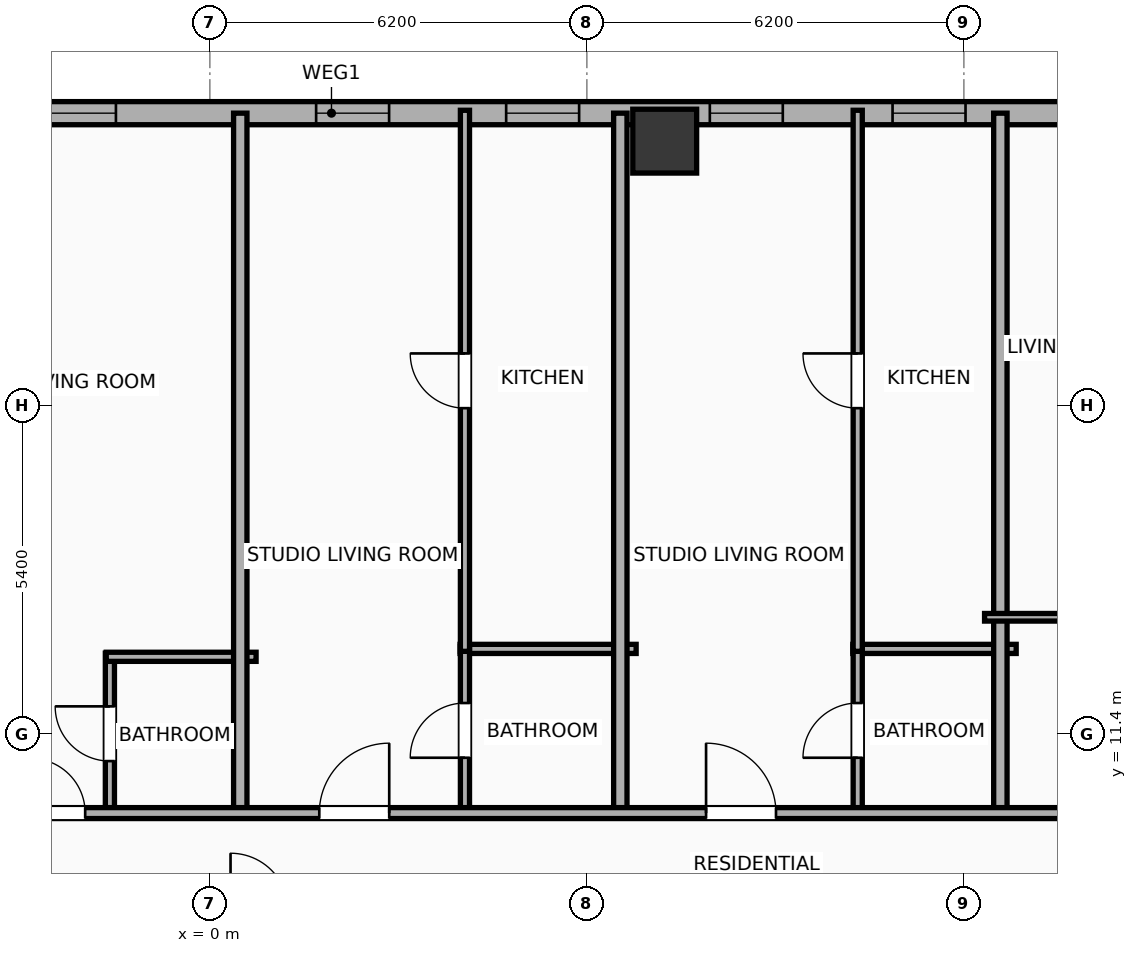
"""IFC4 building model, lengths in metres.
Left out: names, types, materials, properties, quantities, classifications, styles, units other than length and angle.
Written with IfcOpenShell. Run it as: python <this file> out.ifc"""

import sys

from ifc_helpers import new_model, si_unit, direction, frame, frame_2d, origin, origin_2d, place, context, subcontext, project, spatial, rectangle, hollow_rectangle, extrude, element, fill, save


model = new_model("IFC4")
c1 = context("Model", 3, precision=1e-05, world=origin(), true_north=direction((0.0, 1.0)))
c2 = subcontext(c1, "Body", "Model", "MODEL_VIEW")
j1 = project(units=[si_unit("LENGTHUNIT", "METRE"), si_unit("PLANEANGLEUNIT", "RADIAN")], contexts=[c1])
p1 = place(None, origin())
s1 = spatial("IfcSite", under=j1, at=p1, CompositionType="ELEMENT")
p2 = place(p1, origin())
s2 = spatial("IfcBuilding", under=s1, at=p2, CompositionType="ELEMENT")
p3 = place(p2, frame((0.0, 0.0, 124.8)))
s3 = spatial("IfcBuildingStorey", under=s2, at=p3, CompositionType="ELEMENT", Elevation=124.8)
p4 = place(p3, frame((7.48, 21.15, 0.0), z_axis=(0.0, 0.0, 1.0), x_axis=(1.0, 0.0, 0.0)))
e1 = element("IfcColumn", 1, at=p4, inside=s3, PredefinedType="COLUMN", context=c2, shape_type="SweptSolid", body=[
    extrude(hollow_rectangle(XDim=1.05, YDim=1.05, WallThickness=0.036, at=origin_2d()), origin(), (0.0, 0.0, 1.0), 3.9),
])
p5 = place(p3, frame((-25.381, 21.61, 0.0), z_axis=(0.0, 0.0, 1.0), x_axis=(1.0, 0.0, 0.0)))
e2 = element("IfcWall", 2, at=p5, inside=s3, PredefinedType="ELEMENTEDWALL", context=c2, shape_type="SweptSolid", body=[
    extrude(rectangle(XDim=54.763, YDim=0.38, at=frame_2d((27.381, 0.0))), origin(), (0.0, 0.0, 1.0), 3.65),
])
p6 = place(p5, frame((4.795, 0.0, 0.75)))
e3 = element("IfcOpeningElement", 3, at=p6, cuts=e2, PredefinedType="OPENING", context=c2, shape_type="SweptSolid", body=[
    extrude(rectangle(XDim=2.4, YDim=2.1, at=frame_2d((1.2, 1.05))), frame((0.0, 0.2, 0.0), z_axis=(0.0, -1.0, 0.0), x_axis=(1.0, 0.0, 0.0)), (0.0, 0.0, 1.0), 0.4),
])
p7 = place(p5, frame((45.867, 0.0, 0.75)))
e4 = element("IfcOpeningElement", 4, at=p7, cuts=e2, PredefinedType="OPENING", context=c2, shape_type="SweptSolid", body=[
    extrude(rectangle(XDim=2.4, YDim=2.1, at=frame_2d((1.2, 1.05))), frame((0.0, 0.2, 0.0), z_axis=(0.0, -1.0, 0.0), x_axis=(1.0, 0.0, 0.0)), (0.0, 0.0, 1.0), 0.4),
])
p8 = place(p5, frame((2.408, 0.0, 0.75)))
e5 = element("IfcOpeningElement", 5, at=p8, cuts=e2, PredefinedType="OPENING", context=c2, shape_type="SweptSolid", body=[
    extrude(rectangle(XDim=1.2, YDim=2.05, at=frame_2d((0.6, 1.025))), frame((0.0, 0.2, 0.0), z_axis=(0.0, -1.0, 0.0), x_axis=(1.0, 0.0, 0.0)), (0.0, 0.0, 1.0), 0.4),
])
p9 = place(p5, frame((8.952, 0.0, 0.75)))
e6 = element("IfcOpeningElement", 6, at=p9, cuts=e2, PredefinedType="OPENING", context=c2, shape_type="SweptSolid", body=[
    extrude(rectangle(XDim=1.2, YDim=2.05, at=frame_2d((0.6, 1.025))), frame((0.0, 0.2, 0.0), z_axis=(0.0, -1.0, 0.0), x_axis=(1.0, 0.0, 0.0)), (0.0, 0.0, 1.0), 0.4),
])
p10 = place(p5, frame((17.132, 0.0, 0.75)))
e7 = element("IfcOpeningElement", 7, at=p10, cuts=e2, PredefinedType="OPENING", context=c2, shape_type="SweptSolid", body=[
    extrude(rectangle(XDim=1.2, YDim=2.05, at=frame_2d((0.6, 1.025))), frame((0.0, 0.2, 0.0), z_axis=(0.0, -1.0, 0.0), x_axis=(1.0, 0.0, 0.0)), (0.0, 0.0, 1.0), 0.4),
])
p11 = place(p5, frame((14.007, 0.0, 0.75)))
e8 = element("IfcOpeningElement", 8, at=p11, cuts=e2, PredefinedType="OPENING", context=c2, shape_type="SweptSolid", body=[
    extrude(rectangle(XDim=1.2, YDim=2.05, at=frame_2d((0.6, 1.025))), frame((0.0, 0.2, 0.0), z_axis=(0.0, -1.0, 0.0), x_axis=(1.0, 0.0, 0.0)), (0.0, 0.0, 1.0), 0.4),
])
p12 = place(p5, frame((22.636, 0.0, 0.75)))
e9 = element("IfcOpeningElement", 9, at=p12, cuts=e2, PredefinedType="OPENING", context=c2, shape_type="SweptSolid", body=[
    extrude(rectangle(XDim=1.2, YDim=2.05, at=frame_2d((0.6, 1.025))), frame((0.0, 0.2, 0.0), z_axis=(0.0, -1.0, 0.0), x_axis=(1.0, 0.0, 0.0)), (0.0, 0.0, 1.0), 0.4),
])
p13 = place(p5, frame((27.129, 0.0, 0.75)))
e10 = element("IfcOpeningElement", 10, at=p13, cuts=e2, PredefinedType="OPENING", context=c2, shape_type="SweptSolid", body=[
    extrude(rectangle(XDim=1.2, YDim=2.05, at=frame_2d((0.6, 1.025))), frame((0.0, 0.2, 0.0), z_axis=(0.0, -1.0, 0.0), x_axis=(1.0, 0.0, 0.0)), (0.0, 0.0, 1.0), 0.4),
])
p14 = place(p5, frame((30.254, 0.0, 0.75)))
e11 = element("IfcOpeningElement", 11, at=p14, cuts=e2, PredefinedType="OPENING", context=c2, shape_type="SweptSolid", body=[
    extrude(rectangle(XDim=1.2, YDim=2.05, at=frame_2d((0.6, 1.025))), frame((0.0, 0.2, 0.0), z_axis=(0.0, -1.0, 0.0), x_axis=(1.0, 0.0, 0.0)), (0.0, 0.0, 1.0), 0.4),
])
p15 = place(p5, frame((33.603, 0.0, 0.75)))
e12 = element("IfcOpeningElement", 12, at=p15, cuts=e2, PredefinedType="OPENING", context=c2, shape_type="SweptSolid", body=[
    extrude(rectangle(XDim=1.2, YDim=2.05, at=frame_2d((0.6, 1.025))), frame((0.0, 0.2, 0.0), z_axis=(0.0, -1.0, 0.0), x_axis=(1.0, 0.0, 0.0)), (0.0, 0.0, 1.0), 0.4),
])
p16 = place(p5, frame((36.608, 0.0, 0.75)))
e13 = element("IfcOpeningElement", 13, at=p16, cuts=e2, PredefinedType="OPENING", context=c2, shape_type="SweptSolid", body=[
    extrude(rectangle(XDim=1.2, YDim=2.05, at=frame_2d((0.6, 1.025))), frame((0.0, 0.2, 0.0), z_axis=(0.0, -1.0, 0.0), x_axis=(1.0, 0.0, 0.0)), (0.0, 0.0, 1.0), 0.4),
])
p17 = place(p5, frame((39.446, 0.0, 0.75)))
e14 = element("IfcOpeningElement", 14, at=p17, cuts=e2, PredefinedType="OPENING", context=c2, shape_type="SweptSolid", body=[
    extrude(rectangle(XDim=1.2, YDim=2.05, at=frame_2d((0.6, 1.025))), frame((0.0, 0.2, 0.0), z_axis=(0.0, -1.0, 0.0), x_axis=(1.0, 0.0, 0.0)), (0.0, 0.0, 1.0), 0.4),
])
p18 = place(p5, frame((42.27, 0.0, 0.75)))
e15 = element("IfcOpeningElement", 15, at=p18, cuts=e2, PredefinedType="OPENING", context=c2, shape_type="SweptSolid", body=[
    extrude(rectangle(XDim=0.85, YDim=2.05, at=frame_2d((0.425, 1.025))), frame((0.0, 0.2, 0.0), z_axis=(0.0, -1.0, 0.0), x_axis=(1.0, 0.0, 0.0)), (0.0, 0.0, 1.0), 0.4),
])
p19 = place(p5, frame((49.554, 0.0, 0.75)))
e16 = element("IfcOpeningElement", 16, at=p19, cuts=e2, PredefinedType="OPENING", context=c2, shape_type="SweptSolid", body=[
    extrude(rectangle(XDim=1.2, YDim=2.05, at=frame_2d((0.6, 1.025))), frame((0.0, 0.2, 0.0), z_axis=(0.0, -1.0, 0.0), x_axis=(1.0, 0.0, 0.0)), (0.0, 0.0, 1.0), 0.4),
])
p20 = place(p5, frame((52.266, 0.0, 0.75)))
e17 = element("IfcOpeningElement", 17, at=p20, cuts=e2, PredefinedType="OPENING", context=c2, shape_type="SweptSolid", body=[
    extrude(rectangle(XDim=1.2, YDim=2.05, at=frame_2d((0.6, 1.025))), frame((0.0, 0.2, 0.0), z_axis=(0.0, -1.0, 0.0), x_axis=(1.0, 0.0, 0.0)), (0.0, 0.0, 1.0), 0.4),
])
p21 = place(p3, frame((-1.644, 10.08, 0.0), z_axis=(0.0, 0.0, 1.0), x_axis=(0.0, 1.0, 0.0)))
e18 = element("IfcWall", 18, at=p21, inside=s3, PredefinedType="PLUMBINGWALL", context=c2, shape_type="SweptSolid", body=[
    extrude(rectangle(XDim=2.65, YDim=0.15, at=frame_2d((1.325, 0.0))), origin(), (0.0, 0.0, 1.0), 3.65),
])
p22 = place(p21, frame((0.875, 0.0, 0.0)))
e19 = element("IfcOpeningElement", 19, at=p22, cuts=e18, PredefinedType="OPENING", context=c2, shape_type="SweptSolid", body=[
    extrude(rectangle(XDim=0.9, YDim=2.05, at=frame_2d((0.45, 1.025))), frame((0.0, 0.085, 0.0), z_axis=(0.0, -1.0, 0.0), x_axis=(1.0, 0.0, 0.0)), (0.0, 0.0, 1.0), 0.17),
])
p23 = place(p3, frame((-1.704, 12.67, 0.0), z_axis=(0.0, 0.0, 1.0), x_axis=(1.0, 0.0, 0.0)))
e20 = element("IfcWall", 20, at=p23, inside=s3, PredefinedType="PLUMBINGWALL", context=c2, shape_type="SweptSolid", body=[
    extrude(rectangle(XDim=2.464, YDim=0.15, at=frame_2d((1.232, 0.0))), origin(), (0.0, 0.0, 1.0), 3.65),
])
p24 = place(p3, frame((0.5, 10.02, 0.0), z_axis=(0.0, 0.0, 1.0), x_axis=(0.0, 1.0, 0.0)))
e21 = element("IfcWall", 21, at=p24, inside=s3, PredefinedType="PARTITIONING", context=c2, shape_type="SweptSolid", body=[
    extrude(rectangle(XDim=11.59, YDim=0.22, at=frame_2d((5.795, 0.0))), origin(), (0.0, 0.0, 1.0), 3.65),
])
p25 = place(p3, frame((4.115, 12.8, 0.0), z_axis=(0.0, 0.0, 1.0), x_axis=(1.0, 0.0, 0.0)))
e22 = element("IfcWall", 22, at=p25, inside=s3, PredefinedType="PLUMBINGWALL", context=c2, shape_type="SweptSolid", body=[
    extrude(rectangle(XDim=2.895, YDim=0.15, at=frame_2d((1.448, 0.0))), origin(), (0.0, 0.0, 1.0), 3.65),
])
p26 = place(p3, frame((4.195, 10.08, 0.0), z_axis=(0.0, 0.0, 1.0), x_axis=(0.0, 1.0, 0.0)))
e23 = element("IfcWall", 23, at=p26, inside=s3, PredefinedType="PLUMBINGWALL", context=c2, shape_type="SweptSolid", body=[
    extrude(rectangle(XDim=2.76, YDim=0.15, at=frame_2d((1.38, 0.0))), origin(), (0.0, 0.0, 1.0), 3.65),
])
p27 = place(p26, frame((0.93, 0.0, 0.0)))
e24 = element("IfcOpeningElement", 24, at=p27, cuts=e23, PredefinedType="OPENING", context=c2, shape_type="SweptSolid", body=[
    extrude(rectangle(XDim=0.9, YDim=2.05, at=frame_2d((0.45, 1.025))), frame((0.0, 0.085, 0.0), z_axis=(0.0, -1.0, 0.0), x_axis=(1.0, 0.0, 0.0)), (0.0, 0.0, 1.0), 0.17),
])
p28 = place(p3, frame((4.195, 12.76, 0.0), z_axis=(0.0, 0.0, 1.0), x_axis=(0.0, 1.0, 0.0)))
e25 = element("IfcWall", 25, at=p28, inside=s3, PredefinedType="PLUMBINGWALL", context=c2, shape_type="SweptSolid", body=[
    extrude(rectangle(XDim=8.898, YDim=0.15, at=frame_2d((4.449, 0.0))), origin(), (0.0, 0.0, 1.0), 3.65),
])
p29 = place(p28, frame((3.999, 0.0, 0.0)))
e26 = element("IfcOpeningElement", 26, at=p29, cuts=e25, PredefinedType="OPENING", context=c2, shape_type="SweptSolid", body=[
    extrude(rectangle(XDim=0.9, YDim=2.05, at=frame_2d((0.45, 1.025))), frame((0.0, 0.085, 0.0), z_axis=(0.0, -1.0, 0.0), x_axis=(1.0, 0.0, 0.0)), (0.0, 0.0, 1.0), 0.17),
])
p30 = place(p3, frame((6.75, 10.02, 0.0), z_axis=(0.0, 0.0, 1.0), x_axis=(0.0, 1.0, 0.0)))
e27 = element("IfcWall", 27, at=p30, inside=s3, PredefinedType="PARTITIONING", context=c2, shape_type="SweptSolid", body=[
    extrude(rectangle(XDim=11.59, YDim=0.22, at=frame_2d((5.795, 0.0))), origin(), (0.0, 0.0, 1.0), 3.04),
])
p31 = place(p3, frame((10.574, 12.8, 0.0), z_axis=(0.0, 0.0, 1.0), x_axis=(1.0, 0.0, 0.0)))
e28 = element("IfcWall", 28, at=p31, inside=s3, PredefinedType="PLUMBINGWALL", context=c2, shape_type="SweptSolid", body=[
    extrude(rectangle(XDim=2.686, YDim=0.15, at=frame_2d((1.343, 0.0))), origin(), (0.0, 0.0, 1.0), 3.65),
])
p32 = place(p3, frame((10.654, 10.08, 0.0), z_axis=(0.0, 0.0, 1.0), x_axis=(0.0, 1.0, 0.0)))
e29 = element("IfcWall", 29, at=p32, inside=s3, PredefinedType="PLUMBINGWALL", context=c2, shape_type="SweptSolid", body=[
    extrude(rectangle(XDim=2.76, YDim=0.15, at=frame_2d((1.38, 0.0))), origin(), (0.0, 0.0, 1.0), 3.65),
])
p33 = place(p32, frame((0.93, 0.0, 0.0)))
e30 = element("IfcOpeningElement", 30, at=p33, cuts=e29, PredefinedType="OPENING", context=c2, shape_type="SweptSolid", body=[
    extrude(rectangle(XDim=0.9, YDim=2.05, at=frame_2d((0.45, 1.025))), frame((0.0, 0.085, 0.0), z_axis=(0.0, -1.0, 0.0), x_axis=(1.0, 0.0, 0.0)), (0.0, 0.0, 1.0), 0.17),
])
p34 = place(p3, frame((10.654, 12.76, 0.0), z_axis=(0.0, 0.0, 1.0), x_axis=(0.0, 1.0, 0.0)))
e31 = element("IfcWall", 31, at=p34, inside=s3, PredefinedType="PLUMBINGWALL", context=c2, shape_type="SweptSolid", body=[
    extrude(rectangle(XDim=8.898, YDim=0.15, at=frame_2d((4.449, 0.0))), origin(), (0.0, 0.0, 1.0), 3.65),
])
p35 = place(p34, frame((3.999, 0.0, 0.0)))
e32 = element("IfcOpeningElement", 32, at=p35, cuts=e31, PredefinedType="OPENING", context=c2, shape_type="SweptSolid", body=[
    extrude(rectangle(XDim=0.9, YDim=2.05, at=frame_2d((0.45, 1.025))), frame((0.0, 0.085, 0.0), z_axis=(0.0, -1.0, 0.0), x_axis=(1.0, 0.0, 0.0)), (0.0, 0.0, 1.0), 0.17),
])
p36 = place(p3, frame((13.0, 10.02, 0.0), z_axis=(0.0, 0.0, 1.0), x_axis=(0.0, 1.0, 0.0)))
e33 = element("IfcWall", 33, at=p36, inside=s3, PredefinedType="PARTITIONING", context=c2, shape_type="SweptSolid", body=[
    extrude(rectangle(XDim=11.59, YDim=0.22, at=frame_2d((5.795, 0.0))), origin(), (0.0, 0.0, 1.0), 3.65),
])
p37 = place(p3, frame((12.74, 13.32, 0.0), z_axis=(0.0, 0.0, 1.0), x_axis=(1.0, 0.0, 0.0)))
e34 = element("IfcWall", 34, at=p37, inside=s3, PredefinedType="PARTITIONING", context=c2, shape_type="SweptSolid", body=[
    extrude(rectangle(XDim=2.69, YDim=0.125, at=frame_2d((1.345, 0.0))), origin(), (0.0, 0.0, 1.0), 3.65),
])
p38 = place(p3, frame((-29.21, 10.1, 0.0), z_axis=(0.0, 0.0, 1.0), x_axis=(1.0, 0.0, 0.0)))
e35 = element("IfcWall", 35, at=p38, inside=s3, PredefinedType="PARTITIONING", context=c2, shape_type="SweptSolid", body=[
    extrude(rectangle(XDim=62.42, YDim=0.18, at=frame_2d((31.21, 0.0))), origin(), (0.0, 0.0, 1.0), 3.65),
])
p39 = place(p38, frame((2.54, 0.0, 0.0)))
e36 = element("IfcOpeningElement", 36, at=p39, cuts=e35, PredefinedType="OPENING", context=c2, shape_type="SweptSolid", body=[
    extrude(rectangle(XDim=0.9, YDim=2.05, at=frame_2d((0.45, 1.025))), frame((0.0, 0.1, 0.0), z_axis=(0.0, -1.0, 0.0), x_axis=(1.0, 0.0, 0.0)), (0.0, 0.0, 1.0), 0.2),
])
p40 = place(p38, frame((9.1, 0.0, 0.0)))
e37 = element("IfcOpeningElement", 37, at=p40, cuts=e35, PredefinedType="OPENING", context=c2, shape_type="SweptSolid", body=[
    extrude(rectangle(XDim=1.15, YDim=2.05, at=frame_2d((0.575, 1.025))), frame((0.0, 0.1, 0.0), z_axis=(0.0, -1.0, 0.0), x_axis=(1.0, 0.0, 0.0)), (0.0, 0.0, 1.0), 0.2),
])
p41 = place(p38, frame((14.063, 0.0, 0.0)))
e38 = element("IfcOpeningElement", 38, at=p41, cuts=e35, PredefinedType="OPENING", context=c2, shape_type="SweptSolid", body=[
    extrude(rectangle(XDim=0.9, YDim=2.05, at=frame_2d((0.45, 1.025))), frame((0.0, 0.1, 0.0), z_axis=(0.0, -1.0, 0.0), x_axis=(1.0, 0.0, 0.0)), (0.0, 0.0, 1.0), 0.2),
])
p42 = place(p38, frame((20.954, 0.0, 0.0)))
e39 = element("IfcOpeningElement", 39, at=p42, cuts=e35, PredefinedType="OPENING", context=c2, shape_type="SweptSolid", body=[
    extrude(rectangle(XDim=1.15, YDim=2.05, at=frame_2d((0.575, 1.025))), frame((0.0, 0.1, 0.0), z_axis=(0.0, -1.0, 0.0), x_axis=(1.0, 0.0, 0.0)), (0.0, 0.0, 1.0), 0.2),
])
p43 = place(p38, frame((26.26, 0.0, 0.0)))
e40 = element("IfcOpeningElement", 40, at=p43, cuts=e35, PredefinedType="OPENING", context=c2, shape_type="SweptSolid", body=[
    extrude(rectangle(XDim=0.9, YDim=2.05, at=frame_2d((0.45, 1.025))), frame((0.0, 0.1, 0.0), z_axis=(0.0, -1.0, 0.0), x_axis=(1.0, 0.0, 0.0)), (0.0, 0.0, 1.0), 0.2),
])
p44 = place(p38, frame((31.01, 0.0, 0.0)))
e41 = element("IfcOpeningElement", 41, at=p44, cuts=e35, PredefinedType="OPENING", context=c2, shape_type="SweptSolid", body=[
    extrude(rectangle(XDim=1.15, YDim=2.05, at=frame_2d((0.575, 1.025))), frame((0.0, 0.1, 0.0), z_axis=(0.0, -1.0, 0.0), x_axis=(1.0, 0.0, 0.0)), (0.0, 0.0, 1.0), 0.2),
])
p45 = place(p38, frame((37.37, 0.0, 0.0)))
e42 = element("IfcOpeningElement", 42, at=p45, cuts=e35, PredefinedType="OPENING", context=c2, shape_type="SweptSolid", body=[
    extrude(rectangle(XDim=1.15, YDim=2.05, at=frame_2d((0.575, 1.025))), frame((0.0, 0.1, 0.0), z_axis=(0.0, -1.0, 0.0), x_axis=(1.0, 0.0, 0.0)), (0.0, 0.0, 1.0), 0.2),
])
p46 = place(p38, frame((45.298, 0.0, 0.0)))
e43 = element("IfcOpeningElement", 43, at=p46, cuts=e35, PredefinedType="OPENING", context=c2, shape_type="SweptSolid", body=[
    extrude(rectangle(XDim=0.9, YDim=2.05, at=frame_2d((0.45, 1.025))), frame((0.0, 0.1, 0.0), z_axis=(0.0, -1.0, 0.0), x_axis=(1.0, 0.0, 0.0)), (0.0, 0.0, 1.0), 0.2),
])
p47 = place(p38, frame((52.033, 0.0, 0.0)))
e44 = element("IfcOpeningElement", 44, at=p47, cuts=e35, PredefinedType="OPENING", context=c2, shape_type="SweptSolid", body=[
    extrude(rectangle(XDim=0.9, YDim=2.05, at=frame_2d((0.45, 1.025))), frame((0.0, 0.1, 0.0), z_axis=(0.0, -1.0, 0.0), x_axis=(1.0, 0.0, 0.0)), (0.0, 0.0, 1.0), 0.2),
])
p48 = place(p38, frame((58.805, 0.0, 0.0)))
e45 = element("IfcOpeningElement", 45, at=p48, cuts=e35, PredefinedType="OPENING", context=c2, shape_type="SweptSolid", body=[
    extrude(rectangle(XDim=0.9, YDim=2.05, at=frame_2d((0.45, 1.025))), frame((0.0, 0.1, 0.0), z_axis=(0.0, -1.0, 0.0), x_axis=(1.0, 0.0, 0.0)), (0.0, 0.0, 1.0), 0.2),
])
p49 = place(p12, origin())
e46 = element("IfcWindow", 46, at=p49, inside=s3, PartitioningType="SINGLE_PANEL", PredefinedType="WINDOW", context=c2, shape_type="SweptSolid", body=[
    extrude(rectangle(XDim=1.2, YDim=2.05, at=frame_2d((0.6, 1.025))), frame((0.0, 0.03, 0.0), z_axis=(0.0, -1.0, 0.0), x_axis=(1.0, 0.0, 0.0)), (0.0, 0.0, 1.0), 0.06),
])
fill(e9, e46)
p50 = place(p13, origin())
e47 = element("IfcWindow", 47, at=p50, inside=s3, PartitioningType="SINGLE_PANEL", PredefinedType="WINDOW", context=c2, shape_type="SweptSolid", body=[
    extrude(rectangle(XDim=1.2, YDim=2.05, at=frame_2d((0.6, 1.025))), frame((0.0, 0.03, 0.0), z_axis=(0.0, -1.0, 0.0), x_axis=(1.0, 0.0, 0.0)), (0.0, 0.0, 1.0), 0.06),
])
fill(e10, e47)
p51 = place(p14, origin())
e48 = element("IfcWindow", 48, at=p51, inside=s3, PartitioningType="SINGLE_PANEL", PredefinedType="WINDOW", context=c2, shape_type="SweptSolid", body=[
    extrude(rectangle(XDim=1.2, YDim=2.05, at=frame_2d((0.6, 1.025))), frame((0.0, 0.03, 0.0), z_axis=(0.0, -1.0, 0.0), x_axis=(1.0, 0.0, 0.0)), (0.0, 0.0, 1.0), 0.06),
])
fill(e11, e48)
p52 = place(p15, origin())
e49 = element("IfcWindow", 49, at=p52, inside=s3, PartitioningType="SINGLE_PANEL", PredefinedType="WINDOW", context=c2, shape_type="SweptSolid", body=[
    extrude(rectangle(XDim=1.2, YDim=2.05, at=frame_2d((0.6, 1.025))), frame((0.0, 0.03, 0.0), z_axis=(0.0, -1.0, 0.0), x_axis=(1.0, 0.0, 0.0)), (0.0, 0.0, 1.0), 0.06),
])
fill(e12, e49)
p53 = place(p16, origin())
e50 = element("IfcWindow", 50, at=p53, inside=s3, PartitioningType="SINGLE_PANEL", PredefinedType="WINDOW", context=c2, shape_type="SweptSolid", body=[
    extrude(rectangle(XDim=1.2, YDim=2.05, at=frame_2d((0.6, 1.025))), frame((0.0, 0.03, 0.0), z_axis=(0.0, -1.0, 0.0), x_axis=(1.0, 0.0, 0.0)), (0.0, 0.0, 1.0), 0.06),
])
fill(e13, e50)
p54 = place(p22, origin())
e51 = element("IfcDoor", 51, at=p54, inside=s3, OperationType="SINGLE_SWING_RIGHT", PredefinedType="DOOR", context=c2, shape_type="SweptSolid", body=[
    extrude(rectangle(XDim=0.9, YDim=2.05, at=frame_2d((0.45, 1.025))), frame((0.0, 0.025, 0.0), z_axis=(0.0, -1.0, 0.0), x_axis=(1.0, 0.0, 0.0)), (0.0, 0.0, 1.0), 0.05),
])
fill(e19, e51)
p55 = place(p27, origin())
e52 = element("IfcDoor", 52, at=p55, inside=s3, OperationType="SINGLE_SWING_LEFT", PredefinedType="DOOR", context=c2, shape_type="SweptSolid", body=[
    extrude(rectangle(XDim=0.9, YDim=2.05, at=frame_2d((0.45, 1.025))), frame((0.0, 0.025, 0.0), z_axis=(0.0, -1.0, 0.0), x_axis=(1.0, 0.0, 0.0)), (0.0, 0.0, 1.0), 0.05),
])
fill(e24, e52)
p56 = place(p29, origin())
e53 = element("IfcDoor", 53, at=p56, inside=s3, OperationType="SINGLE_SWING_RIGHT", PredefinedType="DOOR", context=c2, shape_type="SweptSolid", body=[
    extrude(rectangle(XDim=0.9, YDim=2.05, at=frame_2d((0.45, 1.025))), frame((0.0, 0.025, 0.0), z_axis=(0.0, -1.0, 0.0), x_axis=(1.0, 0.0, 0.0)), (0.0, 0.0, 1.0), 0.05),
])
fill(e26, e53)
p57 = place(p33, origin())
e54 = element("IfcDoor", 54, at=p57, inside=s3, OperationType="SINGLE_SWING_LEFT", PredefinedType="DOOR", context=c2, shape_type="SweptSolid", body=[
    extrude(rectangle(XDim=0.9, YDim=2.05, at=frame_2d((0.45, 1.025))), frame((0.0, 0.025, 0.0), z_axis=(0.0, -1.0, 0.0), x_axis=(1.0, 0.0, 0.0)), (0.0, 0.0, 1.0), 0.05),
])
fill(e30, e54)
p58 = place(p35, origin())
e55 = element("IfcDoor", 55, at=p58, inside=s3, OperationType="SINGLE_SWING_RIGHT", PredefinedType="DOOR", context=c2, shape_type="SweptSolid", body=[
    extrude(rectangle(XDim=0.9, YDim=2.05, at=frame_2d((0.45, 1.025))), frame((0.0, 0.025, 0.0), z_axis=(0.0, -1.0, 0.0), x_axis=(1.0, 0.0, 0.0)), (0.0, 0.0, 1.0), 0.05),
])
fill(e32, e55)
p59 = place(p43, origin())
e56 = element("IfcDoor", 56, at=p59, inside=s3, OperationType="SINGLE_SWING_LEFT", PredefinedType="DOOR", context=c2, shape_type="SweptSolid", body=[
    extrude(rectangle(XDim=0.9, YDim=2.05, at=frame_2d((0.45, 1.025))), frame((0.0, 0.025, 0.0), z_axis=(0.0, -1.0, 0.0), x_axis=(1.0, 0.0, 0.0)), (0.0, 0.0, 1.0), 0.05),
])
fill(e40, e56)
p60 = place(p44, origin())
e57 = element("IfcDoor", 57, at=p60, inside=s3, OperationType="SINGLE_SWING_RIGHT", PredefinedType="DOOR", context=c2, shape_type="SweptSolid", body=[
    extrude(rectangle(XDim=1.15, YDim=2.05, at=frame_2d((0.575, 1.025))), frame((0.0, 0.025, 0.0), z_axis=(0.0, -1.0, 0.0), x_axis=(1.0, 0.0, 0.0)), (0.0, 0.0, 1.0), 0.05),
])
fill(e41, e57)
p61 = place(p45, origin())
e58 = element("IfcDoor", 58, at=p61, inside=s3, OperationType="SINGLE_SWING_LEFT", PredefinedType="DOOR", context=c2, shape_type="SweptSolid", body=[
    extrude(rectangle(XDim=1.15, YDim=2.05, at=frame_2d((0.575, 1.025))), frame((0.0, 0.025, 0.0), z_axis=(0.0, -1.0, 0.0), x_axis=(1.0, 0.0, 0.0)), (0.0, 0.0, 1.0), 0.05),
])
fill(e42, e58)
save(model, sys.argv[1])
